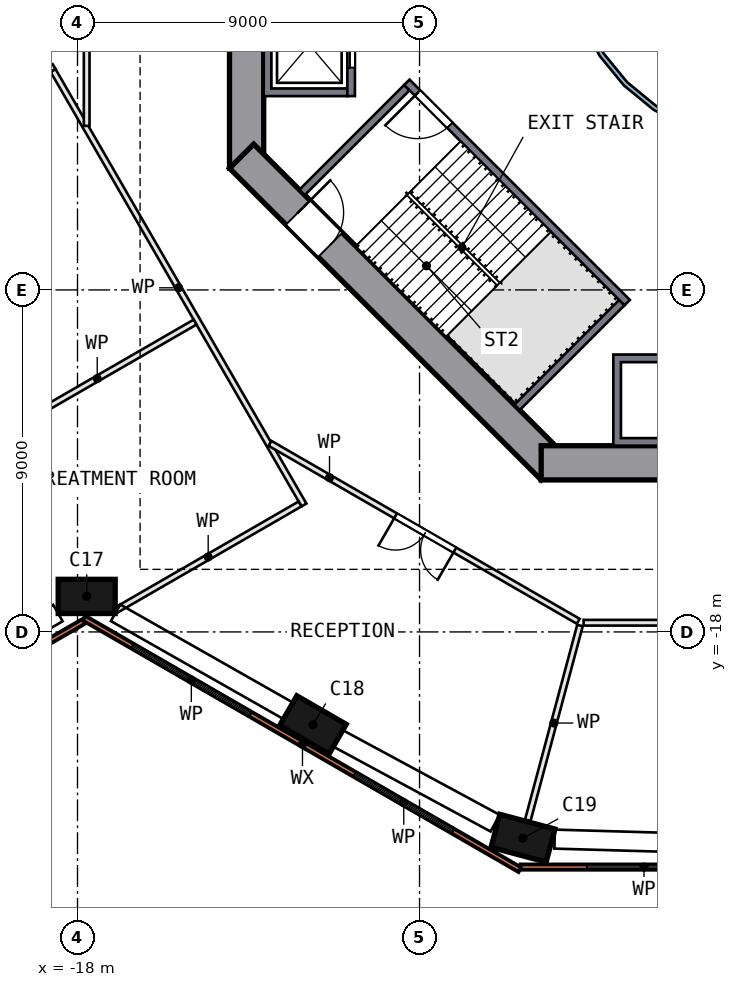
"""IFC4 building model, lengths in metres.
Left out: names, types, materials, properties, quantities, classifications, styles, units other than length and angle.
Written with IfcOpenShell. Run it as: python <this file> out.ifc"""

import sys

from ifc_helpers import new_model, si_unit, direction, frame, frame_2d, origin, origin_2d, place, context, subcontext, project, spatial, polyline, rectangle, outline, extrude, element, fill, save


model = new_model("IFC4")
c1 = context("Model", 3, precision=1e-05, world=origin(), true_north=direction((0.0, 1.0)))
c2 = subcontext(c1, "Body", "Model", "MODEL_VIEW")
j1 = project(units=[si_unit("LENGTHUNIT", "METRE"), si_unit("PLANEANGLEUNIT", "RADIAN")], contexts=[c1])
p1 = place(None, origin())
s1 = spatial("IfcSite", under=j1, at=p1, CompositionType="ELEMENT")
p2 = place(p1, origin())
s2 = spatial("IfcBuilding", under=s1, at=p2, CompositionType="ELEMENT")
p3 = place(p2, frame((0.0, 0.0, 19.0)))
s3 = spatial("IfcBuildingStorey", under=s2, at=p3, CompositionType="ELEMENT", Elevation=19.0)
for number, where, z_axis, x_axis in (
    (1, (-17.758, -17.065, 0.0), (0.0, 0.0, 1.0), (-1.0, 0.0, 0.0)),
    (2, (-11.804, -20.445, 0.0), (0.0, 0.0, 1.0), (0.866, -0.5, 0.0)),
    (3, (-6.278, -23.428, 0.0), (0.0, 0.0, 1.0), (-0.966, 0.259, 0.0)),
):
    element("IfcColumn", number, at=place(p3, frame(where, z_axis=z_axis, x_axis=x_axis)), inside=s3, PredefinedType="COLUMN", context=c2, shape_type="SweptSolid", body=[
        extrude(rectangle(XDim=1.5, YDim=0.9, at=origin_2d()), origin(), (0.0, 0.0, 1.0), 4.05),
    ])
p4 = place(p3, frame((-13.55, 5.799, 0.0), z_axis=(0.0, 0.0, 1.0), x_axis=(0.0, -1.0, 0.0)))
e4 = element("IfcWall", 4, at=p4, inside=s3, PredefinedType="SHEAR", context=c2, shape_type="SweptSolid", body=[
    extrude(rectangle(XDim=11.598, YDim=0.9, at=frame_2d((5.799, 0.0))), origin(), (0.0, 0.0, 1.0), 4.5),
])
p5 = place(p4, frame((4.899, 0.0, 0.0)))
e5 = element("IfcOpeningElement", 5, at=p5, cuts=e4, PredefinedType="OPENING", context=c2, shape_type="SweptSolid", body=[
    extrude(rectangle(XDim=1.8, YDim=2.1, at=frame_2d((0.9, 1.05))), frame((0.0, 0.46, 0.0), z_axis=(0.0, -1.0, 0.0), x_axis=(1.0, 0.0, 0.0)), (0.0, 0.0, 1.0), 0.92),
])
p6 = place(p3, frame((-13.682, -5.481, 0.0), z_axis=(0.0, 0.0, 1.0), x_axis=(0.707106781, -0.707106781, 0.0)))
e6 = element("IfcWall", 6, at=p6, inside=s3, PredefinedType="SHEAR", context=c2, shape_type="SweptSolid", body=[
    extrude(rectangle(XDim=11.598, YDim=0.9, at=frame_2d((5.799, 0.0))), origin(), (0.0, 0.0, 1.0), 4.5),
])
p7 = place(p6, frame((2.099, 0.0, 0.0)))
e7 = element("IfcOpeningElement", 7, at=p7, cuts=e6, PredefinedType="OPENING", context=c2, shape_type="SweptSolid", body=[
    extrude(rectangle(XDim=1.2, YDim=2.1, at=frame_2d((0.6, 1.05))), frame((0.0, 0.46, 0.0), z_axis=(0.0, -1.0, 0.0), x_axis=(1.0, 0.0, 0.0)), (0.0, 0.0, 1.0), 0.92),
])
p8 = place(p3, frame((-5.799, -13.55, 0.0), z_axis=(0.0, 0.0, 1.0), x_axis=(1.0, 0.0, 0.0)))
e8 = element("IfcWall", 8, at=p8, inside=s3, PredefinedType="SHEAR", context=c2, shape_type="SweptSolid", body=[
    extrude(rectangle(XDim=11.598, YDim=0.9, at=frame_2d((5.799, 0.0))), origin(), (0.0, 0.0, 1.0), 4.5),
])
p9 = place(p8, frame((4.899, 0.0, 0.0)))
e9 = element("IfcOpeningElement", 9, at=p9, cuts=e8, PredefinedType="OPENING", context=c2, shape_type="SweptSolid", body=[
    extrude(rectangle(XDim=1.8, YDim=2.1, at=frame_2d((0.9, 1.05))), frame((0.0, 0.46, 0.0), z_axis=(0.0, -1.0, 0.0), x_axis=(1.0, 0.0, 0.0)), (0.0, 0.0, 1.0), 0.92),
])
p10 = place(p3, frame((-27.321, -23.198, 0.0), z_axis=(0.0, 0.0, 1.0), x_axis=(0.866030546, 0.499991093, 0.0)))
e10 = element("IfcWall", 10, at=p10, inside=s3, PredefinedType="SOLIDWALL", context=c2, shape_type="SweptSolid", body=[
    extrude(rectangle(XDim=10.961, YDim=0.14, at=frame_2d((5.48, 0.0))), origin(), (0.0, 0.0, 1.0), 4.05),
])
p11 = place(p10, frame((6.702, 0.0, 0.9)))
e11 = element("IfcOpeningElement", 11, at=p11, cuts=e10, PredefinedType="OPENING", context=c2, shape_type="SweptSolid", body=[
    extrude(rectangle(XDim=3.0, YDim=2.4, at=frame_2d((1.5, 1.2))), frame((0.0, 0.08, 0.0), z_axis=(0.0, -1.0, 0.0), x_axis=(1.0, 0.0, 0.0)), (0.0, 0.0, 1.0), 0.16),
])
p12 = place(p3, frame((-17.828, -17.637, 0.0), z_axis=(0.0, 0.0, 1.0), x_axis=(0.866029009, -0.499993756, 0.0)))
e12 = element("IfcWall", 12, at=p12, inside=s3, PredefinedType="SOLIDWALL", context=c2, shape_type="SweptSolid", body=[
    extrude(rectangle(XDim=13.242, YDim=0.14, at=frame_2d((6.621, 0.0))), origin(), (0.0, 0.0, 1.0), 4.05),
])
p13 = place(p12, frame((1.46, 0.0, 0.9)))
e13 = element("IfcOpeningElement", 13, at=p13, cuts=e12, PredefinedType="OPENING", context=c2, shape_type="SweptSolid", body=[
    extrude(rectangle(XDim=3.6, YDim=2.4, at=frame_2d((1.8, 1.2))), frame((0.0, 0.08, 0.0), z_axis=(0.0, -1.0, 0.0), x_axis=(1.0, 0.0, 0.0)), (0.0, 0.0, 1.0), 0.16),
])
p14 = place(p12, frame((8.215, 0.0, 0.9)))
e14 = element("IfcOpeningElement", 14, at=p14, cuts=e12, PredefinedType="OPENING", context=c2, shape_type="SweptSolid", body=[
    extrude(rectangle(XDim=3.0, YDim=2.4, at=frame_2d((1.5, 1.2))), frame((0.0, 0.08, 0.0), z_axis=(0.0, -1.0, 0.0), x_axis=(1.0, 0.0, 0.0)), (0.0, 0.0, 1.0), 0.16),
])
p15 = place(p3, frame((-6.341, -24.188, 0.0), z_axis=(0.0, 0.0, 1.0), x_axis=(1.0, 0.0, 0.0)))
e15 = element("IfcWall", 15, at=p15, inside=s3, PredefinedType="SOLIDWALL", context=c2, shape_type="SweptSolid", body=[
    extrude(rectangle(XDim=12.962, YDim=0.14, at=frame_2d((6.481, 0.0))), origin(), (0.0, 0.0, 1.0), 4.05),
])
p16 = place(p15, frame((1.748, 0.0, 0.9)))
e16 = element("IfcOpeningElement", 16, at=p16, cuts=e15, PredefinedType="OPENING", context=c2, shape_type="SweptSolid", body=[
    extrude(rectangle(XDim=3.0, YDim=2.4, at=frame_2d((1.5, 1.2))), frame((0.0, 0.08, 0.0), z_axis=(0.0, -1.0, 0.0), x_axis=(1.0, 0.0, 0.0)), (0.0, 0.0, 1.0), 0.16),
])
p17 = place(p15, frame((7.935, 0.0, 0.9)))
e17 = element("IfcOpeningElement", 17, at=p17, cuts=e15, PredefinedType="OPENING", context=c2, shape_type="SweptSolid", body=[
    extrude(rectangle(XDim=3.0, YDim=2.4, at=frame_2d((1.5, 1.2))), frame((0.0, 0.08, 0.0), z_axis=(0.0, -1.0, 0.0), x_axis=(1.0, 0.0, 0.0)), (0.0, 0.0, 1.0), 0.16),
])
p18 = place(p3, origin())
e18 = element("IfcWall", 18, at=p18, inside=s3, PredefinedType="SOLIDWALL", context=c2, shape_type="SweptSolid", body=[
    extrude(outline(polyline([(-13.1, -3.9), (-13.1, -1.2), (-10.9, -1.2), (-10.9, -1.4), (-12.9, -1.4), (-12.9, -3.7), (-10.9, -3.7), (-10.9, -3.9), (-13.1, -3.9)])), origin(), (0.0, 0.0, 1.0), 4.05),
])
p19 = place(p3, frame((-10.8, -1.2, 0.0), z_axis=(0.0, 0.0, 1.0), x_axis=(0.0, -1.0, 0.0)))
e19 = element("IfcWall", 19, at=p19, inside=s3, PredefinedType="SOLIDWALL", context=c2, shape_type="SweptSolid", body=[
    extrude(rectangle(XDim=2.7, YDim=0.2, at=frame_2d((1.35, 0.0))), origin(), (0.0, 0.0, 1.0), 4.05),
])
p20 = place(p19, frame((0.75, 0.0, 0.0)))
e20 = element("IfcOpeningElement", 20, at=p20, cuts=e19, PredefinedType="OPENING", context=c2, shape_type="SweptSolid", body=[
    extrude(rectangle(XDim=1.2, YDim=2.1, at=frame_2d((0.6, 1.05))), frame((0.0, 0.11, 0.0), z_axis=(0.0, -1.0, 0.0), x_axis=(1.0, 0.0, 0.0)), (0.0, 0.0, 1.0), 0.22),
])
p21 = place(p3, origin())
e21 = element("IfcWall", 21, at=p21, inside=s3, PredefinedType="SOLIDWALL", context=c2, shape_type="SweptSolid", body=[
    extrude(outline(polyline([(-1.2, -13.1), (-3.9, -13.1), (-3.9, -10.7), (-1.2, -10.7), (-1.2, -13.1)]), holes=[polyline([(-3.7, -10.9), (-3.7, -12.9), (-1.4, -12.9), (-1.4, -10.9), (-3.7, -10.9)])]), origin(), (0.0, 0.0, 1.0), 4.05),
])
p22 = place(p3, frame((-3.535, -9.334, 0.0), z_axis=(0.0, 0.0, 1.0), x_axis=(-0.707106781, 0.707106781, 0.0)))
e22 = element("IfcWall", 22, at=p22, inside=s3, PredefinedType="SOLIDWALL", context=c2, shape_type="SweptSolid", body=[
    extrude(rectangle(XDim=8.2, YDim=0.2, at=frame_2d((4.1, 0.0))), origin(), (0.0, 0.0, 1.0), 4.05),
])
p23 = place(p22, frame((6.6, 0.0, 0.0)))
e23 = element("IfcOpeningElement", 23, at=p23, cuts=e22, PredefinedType="OPENING", context=c2, shape_type="SweptSolid", body=[
    extrude(rectangle(XDim=1.2, YDim=2.1, at=frame_2d((0.6, 1.05))), frame((0.0, 0.11, 0.0), z_axis=(0.0, -1.0, 0.0), x_axis=(1.0, 0.0, 0.0)), (0.0, 0.0, 1.0), 0.22),
])
for number, where, z_axis, x_axis in (
    (24, (-9.334, -3.677, 0.0), (0.0, 0.0, 1.0), (-0.707, -0.707, 0.0)),
    (25, (-3.677, -9.334, 0.0), (0.0, 0.0, 1.0), (-0.707, -0.707, 0.0)),
):
    element("IfcWall", number, at=place(p3, frame(where, z_axis=z_axis, x_axis=x_axis)), inside=s3, PredefinedType="SOLIDWALL", context=c2, shape_type="SweptSolid", body=[
        extrude(rectangle(XDim=3.9, YDim=0.2, at=frame_2d((1.95, 0.0))), origin(), (0.0, 0.0, 1.0), 4.05),
    ])
p24 = place(p3, origin())
e26 = element("IfcWall", 26, at=p24, inside=s3, PredefinedType="SOLIDWALL", context=c2, shape_type="SweptSolid", body=[
    extrude(outline(polyline([(5.021, -0.999), (4.73, -1.959), (4.257, -2.844), (3.62, -3.62), (2.844, -4.257), (1.959, -4.73), (0.999, -5.021), (0.0, -5.12), (-0.999, -5.021), (-1.959, -4.73), (-2.844, -4.257), (-3.62, -3.62), (-4.257, -2.844), (-4.73, -1.959), (-5.021, -0.999), (-5.12, 0.0), (-5.021, 0.999), (-4.73, 1.959), (-4.257, 2.844), (-3.62, 3.62), (-2.844, 4.257), (-1.959, 4.73), (-0.999, 5.021), (0.0, 5.12), (0.999, 5.021), (1.959, 4.73), (2.844, 4.257), (3.62, 3.62), (4.257, 2.844), (4.73, 1.959), (5.021, 0.999), (5.12, 0.0), (5.021, -0.999)]), holes=[polyline([(4.904, 0.976), (4.619, 1.913), (4.157, 2.778), (3.535, 3.535), (2.778, 4.157), (1.913, 4.619), (0.976, 4.904), (0.0, 5.0), (-0.976, 4.904), (-1.913, 4.619), (-2.778, 4.157), (-3.535, 3.535), (-4.157, 2.778), (-4.619, 1.913), (-4.904, 0.976), (-5.0, 0.0), (-4.904, -0.976), (-4.619, -1.913), (-4.157, -2.778), (-3.535, -3.535), (-2.778, -4.157), (-1.913, -4.619), (-0.976, -4.904), (0.0, -5.0), (0.976, -4.904), (1.913, -4.619), (2.778, -4.157), (3.535, -3.535), (4.157, -2.778), (4.619, -1.913), (4.904, -0.976), (5.0, 0.0), (4.904, 0.976)])]), origin(), (0.0, 0.0, 1.0), 4.05),
])
p25 = place(p3, frame((-18.614, -3.126, 0.0), z_axis=(0.0, 0.0, 1.0), x_axis=(-0.866030255, -0.499991598, 0.0)))
e27 = element("IfcWall", 27, at=p25, inside=s3, PredefinedType="PARTITIONING", context=c2, shape_type="SweptSolid", body=[
    extrude(rectangle(XDim=5.732, YDim=0.15, at=frame_2d((2.866, 0.0))), origin(), (0.0, 0.0, 1.0), 4.05),
])
p26 = place(p3, frame((-18.642, -3.228, 0.0), z_axis=(0.0, 0.0, 1.0), x_axis=(0.499988223, -0.866032203, 0.0)))
e28 = element("IfcWall", 28, at=p26, inside=s3, PredefinedType="PARTITIONING", context=c2, shape_type="SweptSolid", body=[
    extrude(rectangle(XDim=13.2, YDim=0.15, at=frame_2d((6.6, 0.0))), origin(), (0.0, 0.0, 1.0), 4.05),
])
p27 = place(p3, frame((-17.758, -4.683, 0.0), z_axis=(0.0, 0.0, 1.0), x_axis=(0.0, 1.0, 0.0)))
e29 = element("IfcWall", 29, at=p27, inside=s3, PredefinedType="PARTITIONING", context=c2, shape_type="SweptSolid", body=[
    extrude(rectangle(XDim=9.367, YDim=0.15, at=frame_2d((4.683, 0.0))), origin(), (0.0, 0.0, 1.0), 4.05),
])
p28 = place(p27, frame((4.15, 0.0, 0.0)))
e30 = element("IfcOpeningElement", 30, at=p28, cuts=e29, PredefinedType="OPENING", context=c2, shape_type="SweptSolid", body=[
    extrude(rectangle(XDim=1.0, YDim=2.1, at=frame_2d((0.5, 1.05))), frame((0.0, 0.085, 0.0), z_axis=(0.0, -1.0, 0.0), x_axis=(1.0, 0.0, 0.0)), (0.0, 0.0, 1.0), 0.17),
])
p29 = place(p3, frame((-16.978, -17.424, 0.0), z_axis=(0.0, 0.0, 1.0), x_axis=(0.866008599, 0.500029105, 0.0)))
e31 = element("IfcWall", 31, at=p29, inside=s3, PredefinedType="PARTITIONING", context=c2, shape_type="SweptSolid", body=[
    extrude(rectangle(XDim=5.582, YDim=0.15, at=frame_2d((2.791, 0.0))), origin(), (0.0, 0.0, 1.0), 4.05),
])
p30 = place(p3, frame((-14.906, -9.848, 0.0), z_axis=(0.0, 0.0, 1.0), x_axis=(-0.866038559, -0.499977214, 0.0)))
e32 = element("IfcWall", 32, at=p30, inside=s3, PredefinedType="PARTITIONING", context=c2, shape_type="SweptSolid", body=[
    extrude(rectangle(XDim=5.945, YDim=0.15, at=frame_2d((2.973, 0.0))), origin(), (0.0, 0.0, 1.0), 4.05),
])
p31 = place(p3, frame((-6.153, -22.965, 0.0), z_axis=(0.0, 0.0, 1.0), x_axis=(0.258843233, 0.965919345, 0.0)))
e33 = element("IfcWall", 33, at=p31, inside=s3, PredefinedType="PARTITIONING", context=c2, shape_type="SweptSolid", body=[
    extrude(rectangle(XDim=5.315, YDim=0.15, at=frame_2d((2.657, 0.0))), origin(), (0.0, 0.0, 1.0), 4.05),
])
p32 = place(p3, frame((-4.823, -17.721, 0.0), z_axis=(0.0, 0.0, 1.0), x_axis=(-0.866037142, 0.499979668, 0.0)))
e34 = element("IfcWall", 34, at=p32, inside=s3, PredefinedType="PARTITIONING", context=c2, shape_type="SweptSolid", body=[
    extrude(rectangle(XDim=9.367, YDim=0.15, at=frame_2d((4.683, 0.0))), origin(), (0.0, 0.0, 1.0), 4.05),
])
p33 = place(p32, frame((3.75, 0.0, 0.0)))
e35 = element("IfcOpeningElement", 35, at=p33, cuts=e34, PredefinedType="OPENING", context=c2, shape_type="SweptSolid", body=[
    extrude(rectangle(XDim=1.8, YDim=2.1, at=frame_2d((0.9, 1.05))), frame((0.0, 0.085, 0.0), z_axis=(0.0, -1.0, 0.0), x_axis=(1.0, 0.0, 0.0)), (0.0, 0.0, 1.0), 0.17),
])
p34 = place(p3, frame((-4.683, -17.758, 0.0), z_axis=(0.0, 0.0, 1.0), x_axis=(1.0, 0.0, 0.0)))
e36 = element("IfcWall", 36, at=p34, inside=s3, PredefinedType="PARTITIONING", context=c2, shape_type="SweptSolid", body=[
    extrude(rectangle(XDim=9.517, YDim=0.15, at=frame_2d((4.758, 0.0))), origin(), (0.0, 0.0, 1.0), 4.05),
])
p35 = place(p34, frame((3.767, 0.0, 0.0)))
e37 = element("IfcOpeningElement", 37, at=p35, cuts=e36, PredefinedType="OPENING", context=c2, shape_type="SweptSolid", body=[
    extrude(rectangle(XDim=1.8, YDim=2.1, at=frame_2d((0.9, 1.05))), frame((0.0, 0.085, 0.0), z_axis=(0.0, -1.0, 0.0), x_axis=(1.0, 0.0, 0.0)), (0.0, 0.0, 1.0), 0.17),
])
p36 = place(p13, origin())
e38 = element("IfcWindow", 38, at=p36, inside=s3, PartitioningType="SINGLE_PANEL", PredefinedType="WINDOW", context=c2, shape_type="SweptSolid", body=[
    extrude(rectangle(XDim=3.6, YDim=2.4, at=frame_2d((1.8, 1.2))), frame((0.0, 0.03, 0.0), z_axis=(0.0, -1.0, 0.0), x_axis=(1.0, 0.0, 0.0)), (0.0, 0.0, 1.0), 0.06),
])
fill(e13, e38)
p37 = place(p14, origin())
e39 = element("IfcWindow", 39, at=p37, inside=s3, PartitioningType="SINGLE_PANEL", PredefinedType="WINDOW", context=c2, shape_type="SweptSolid", body=[
    extrude(rectangle(XDim=3.0, YDim=2.4, at=frame_2d((1.5, 1.2))), frame((0.0, 0.03, 0.0), z_axis=(0.0, -1.0, 0.0), x_axis=(1.0, 0.0, 0.0)), (0.0, 0.0, 1.0), 0.06),
])
fill(e14, e39)
p38 = place(p16, origin())
e40 = element("IfcWindow", 40, at=p38, inside=s3, PartitioningType="SINGLE_PANEL", PredefinedType="WINDOW", context=c2, shape_type="SweptSolid", body=[
    extrude(rectangle(XDim=3.0, YDim=2.4, at=frame_2d((1.5, 1.2))), frame((0.0, 0.03, 0.0), z_axis=(0.0, -1.0, 0.0), x_axis=(1.0, 0.0, 0.0)), (0.0, 0.0, 1.0), 0.06),
])
fill(e16, e40)
p39 = place(p20, origin())
e41 = element("IfcDoor", 41, at=p39, inside=s3, OperationType="DOUBLE_DOOR_SLIDING", PredefinedType="DOOR", context=c2, shape_type="SweptSolid", body=[
    extrude(rectangle(XDim=1.2, YDim=2.1, at=frame_2d((0.6, 1.05))), frame((0.0, 0.025, 0.0), z_axis=(0.0, -1.0, 0.0), x_axis=(1.0, 0.0, 0.0)), (0.0, 0.0, 1.0), 0.05),
])
fill(e20, e41)
p40 = place(p23, origin())
e42 = element("IfcDoor", 42, at=p40, inside=s3, OperationType="SINGLE_SWING_RIGHT", PredefinedType="DOOR", context=c2, shape_type="SweptSolid", body=[
    extrude(rectangle(XDim=1.2, YDim=2.1, at=frame_2d((0.6, 1.05))), frame((0.0, 0.025, 0.0), z_axis=(0.0, -1.0, 0.0), x_axis=(1.0, 0.0, 0.0)), (0.0, 0.0, 1.0), 0.05),
])
fill(e23, e42)
p41 = place(p7, origin())
e43 = element("IfcDoor", 43, at=p41, inside=s3, OperationType="SINGLE_SWING_LEFT", PredefinedType="DOOR", context=c2, shape_type="SweptSolid", body=[
    extrude(rectangle(XDim=1.2, YDim=2.1, at=frame_2d((0.6, 1.05))), frame((0.0, 0.025, 0.0), z_axis=(0.0, -1.0, 0.0), x_axis=(1.0, 0.0, 0.0)), (0.0, 0.0, 1.0), 0.05),
])
fill(e7, e43)
p42 = place(p33, origin())
e44 = element("IfcDoor", 44, at=p42, inside=s3, OperationType="DOUBLE_DOOR_SINGLE_SWING", PredefinedType="DOOR", context=c2, shape_type="SweptSolid", body=[
    extrude(rectangle(XDim=1.8, YDim=2.1, at=frame_2d((0.9, 1.05))), frame((0.0, 0.025, 0.0), z_axis=(0.0, -1.0, 0.0), x_axis=(1.0, 0.0, 0.0)), (0.0, 0.0, 1.0), 0.05),
])
fill(e35, e44)
save(model, sys.argv[1])
